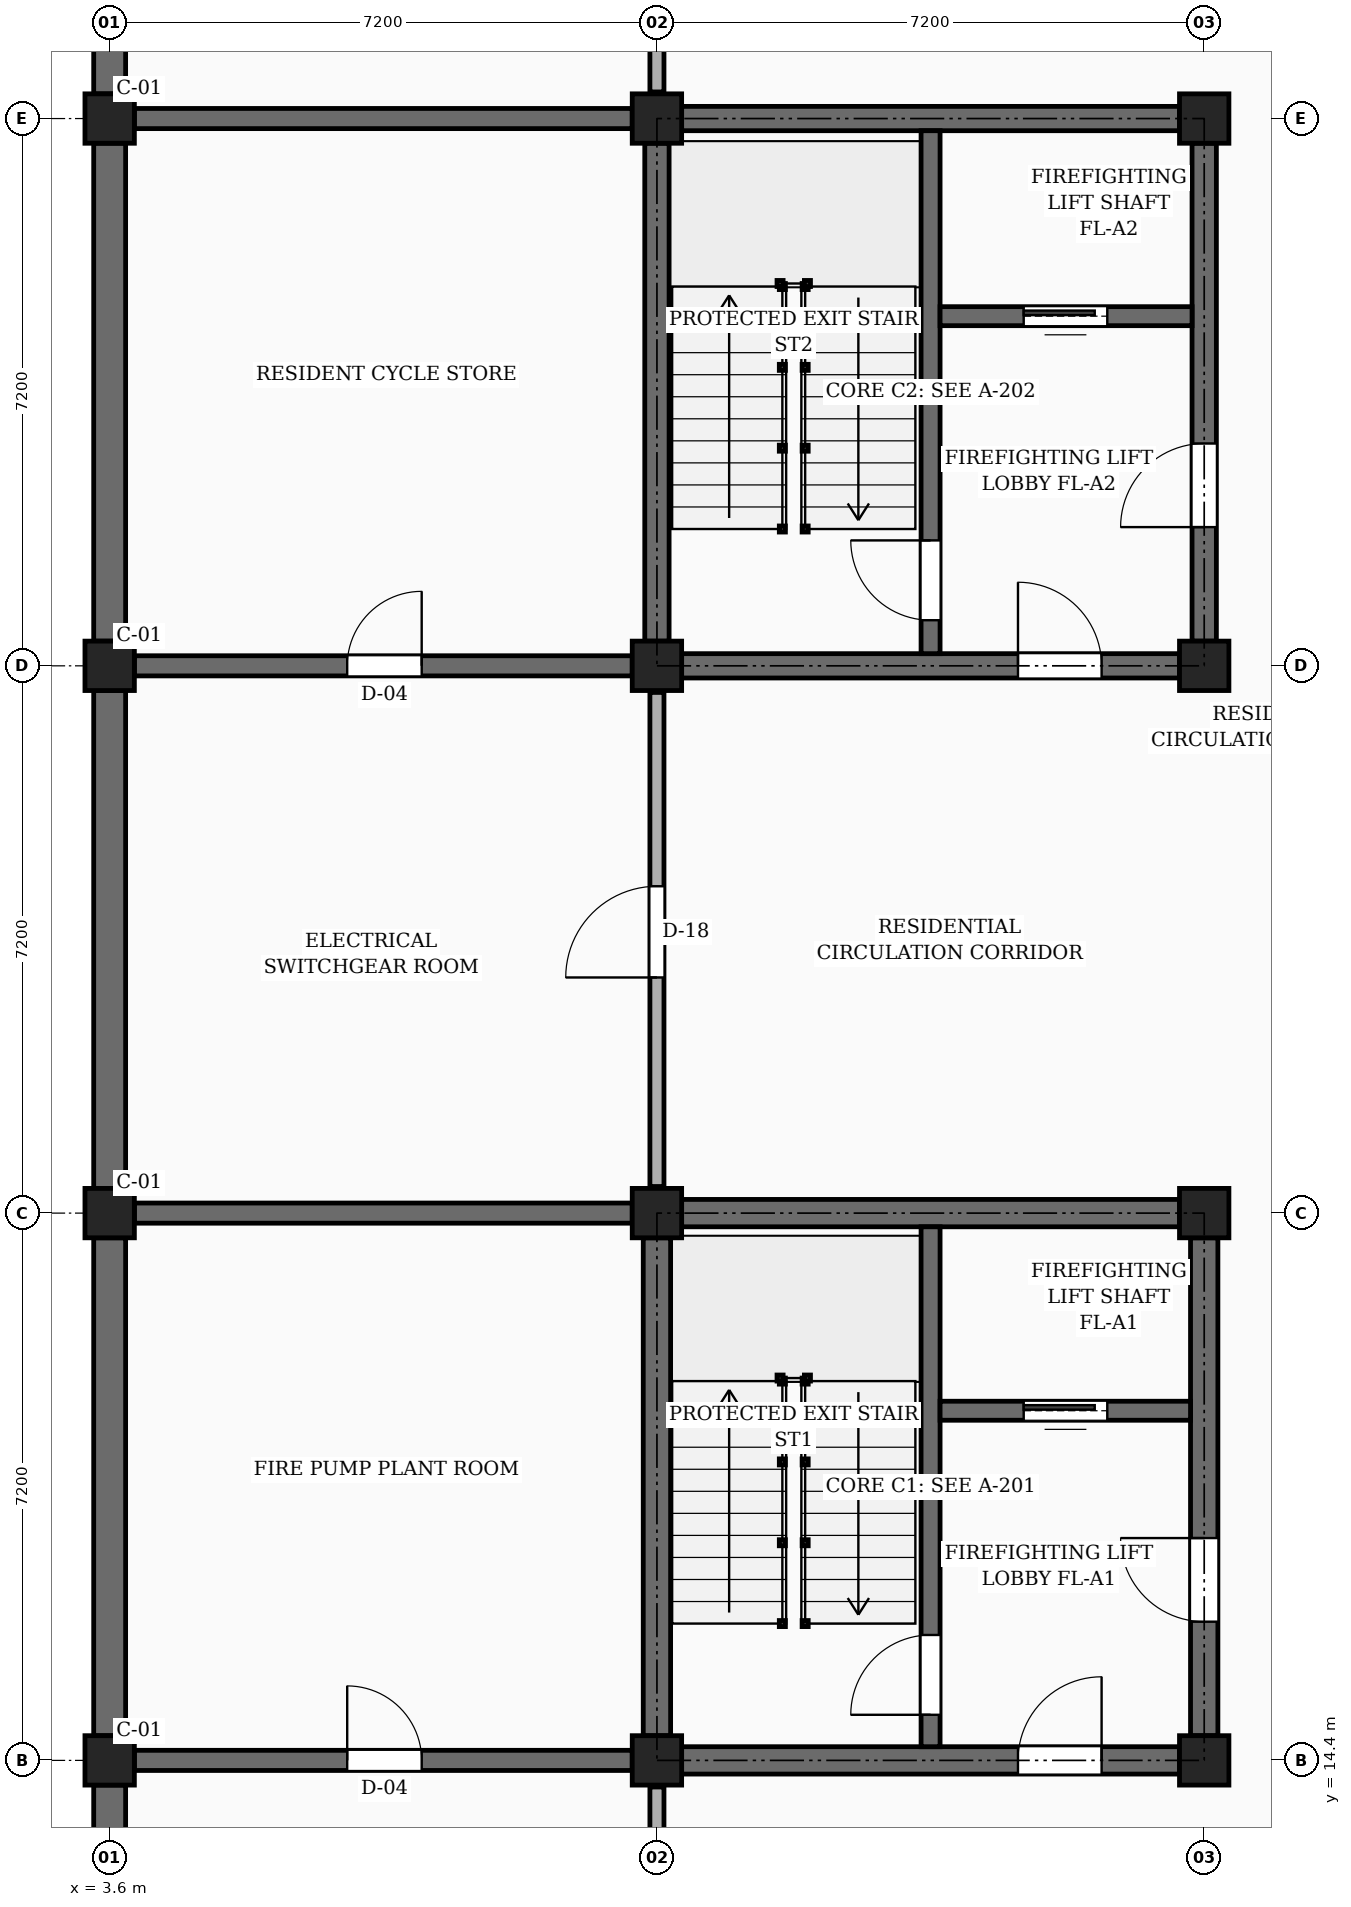
"""IFC4 building model, lengths in metres.
Left out: names, types, materials, properties, quantities, classifications, styles, units other than length and angle.
Written with IfcOpenShell. Run it as: python <this file> out.ifc"""

import sys

from ifc_helpers import new_model, si_unit, direction, frame, frame_2d, origin, origin_2d, place, context, subcontext, project, spatial, rectangle, extrude, element, fill, save


model = new_model("IFC4")
c1 = context("Model", 3, precision=1e-05, world=origin(), true_north=direction((0.0, 1.0)))
c2 = subcontext(c1, "Body", "Model", "MODEL_VIEW")
j1 = project(units=[si_unit("LENGTHUNIT", "METRE"), si_unit("PLANEANGLEUNIT", "RADIAN")], contexts=[c1])
p1 = place(None, origin())
s1 = spatial("IfcSite", under=j1, at=p1, CompositionType="ELEMENT")
p2 = place(p1, origin())
s2 = spatial("IfcBuilding", under=s1, at=p2, CompositionType="ELEMENT")
p3 = place(p2, frame((0.0, 0.0, -4.2)))
s3 = spatial("IfcBuildingStorey", under=s2, at=p3, CompositionType="ELEMENT", Elevation=-4.2)
for number, where, z_axis, x_axis in (
    (1, (3.6, 14.4, 0.0), (0.0, 0.0, 1.0), (1.0, 0.0, 0.0)),
    (2, (3.6, 21.6, 0.0), (0.0, 0.0, 1.0), (1.0, 0.0, 0.0)),
    (3, (3.6, 28.8, 0.0), (0.0, 0.0, 1.0), (1.0, 0.0, 0.0)),
    (4, (3.6, 36.0, 0.0), (0.0, 0.0, 1.0), (1.0, 0.0, 0.0)),
    (5, (10.8, 14.4, 0.0), (0.0, 0.0, 1.0), (1.0, 0.0, 0.0)),
    (6, (10.8, 21.6, 0.0), (0.0, 0.0, 1.0), (1.0, 0.0, 0.0)),
    (7, (10.8, 28.8, 0.0), (0.0, 0.0, 1.0), (1.0, 0.0, 0.0)),
    (8, (10.8, 36.0, 0.0), (0.0, 0.0, 1.0), (1.0, 0.0, 0.0)),
    (9, (18.0, 14.4, 0.0), (0.0, 0.0, 1.0), (1.0, 0.0, 0.0)),
    (10, (18.0, 21.6, 0.0), (0.0, 0.0, 1.0), (1.0, 0.0, 0.0)),
    (11, (18.0, 28.8, 0.0), (0.0, 0.0, 1.0), (1.0, 0.0, 0.0)),
    (12, (18.0, 36.0, 0.0), (0.0, 0.0, 1.0), (1.0, 0.0, 0.0)),
):
    element("IfcColumn", number, at=place(p3, frame(where, z_axis=z_axis, x_axis=x_axis)), inside=s3, PredefinedType="COLUMN", context=c2, shape_type="SweptSolid", body=[
        extrude(rectangle(XDim=0.65, YDim=0.65, at=origin_2d()), origin(), (0.0, 0.0, 1.0), 4.2),
    ])
p4 = place(p3, frame((3.6, 14.075, 0.0), z_axis=(0.0, 0.0, 1.0), x_axis=(0.0, -1.0, 0.0)))
e13 = element("IfcWall", 13, at=p4, inside=s3, PredefinedType="USERDEFINED", context=c2, shape_type="SweptSolid", body=[
    extrude(rectangle(XDim=6.55, YDim=0.42, at=frame_2d((3.275, 0.0))), origin(), (0.0, 0.0, 1.0), 3.03),
])
p5 = place(p3, frame((3.6, 21.275, 0.0), z_axis=(0.0, 0.0, 1.0), x_axis=(0.0, -1.0, 0.0)))
e14 = element("IfcWall", 14, at=p5, inside=s3, PredefinedType="USERDEFINED", context=c2, shape_type="SweptSolid", body=[
    extrude(rectangle(XDim=6.55, YDim=0.42, at=frame_2d((3.275, 0.0))), origin(), (0.0, 0.0, 1.0), 3.03),
])
for number, where, z_axis, x_axis in (
    (15, (3.6, 28.475, 0.0), (0.0, 0.0, 1.0), (0.0, -1.0, 0.0)),
    (16, (3.6, 35.675, 0.0), (0.0, 0.0, 1.0), (0.0, -1.0, 0.0)),
    (17, (3.6, 42.875, 0.0), (0.0, 0.0, 1.0), (0.0, -1.0, 0.0)),
):
    element("IfcWall", number, at=place(p3, frame(where, z_axis=z_axis, x_axis=x_axis)), inside=s3, PredefinedType="USERDEFINED", context=c2, shape_type="SweptSolid", body=[
        extrude(rectangle(XDim=6.55, YDim=0.42, at=frame_2d((3.275, 0.0))), origin(), (0.0, 0.0, 1.0), 3.03),
    ])
p6 = place(p3, frame((3.925, 14.4, 0.0), z_axis=(0.0, 0.0, 1.0), x_axis=(1.0, 0.0, 0.0)))
e18 = element("IfcWall", 18, at=p6, inside=s3, PredefinedType="SOLIDWALL", context=c2, shape_type="SweptSolid", body=[
    extrude(rectangle(XDim=6.55, YDim=0.265, at=frame_2d((3.275, 0.0))), origin(), (0.0, 0.0, 1.0), 3.18),
])
p7 = place(p6, frame((2.8, 0.0, 0.0)))
e19 = element("IfcOpeningElement", 19, at=p7, cuts=e18, PredefinedType="OPENING", context=c2, shape_type="SweptSolid", body=[
    extrude(rectangle(XDim=0.98, YDim=2.12, at=frame_2d((0.49, 1.06))), frame((0.0, 0.143, 0.0), z_axis=(0.0, -1.0, 0.0), x_axis=(1.0, 0.0, 0.0)), (0.0, 0.0, 1.0), 0.285),
])
p8 = place(p3, frame((3.925, 21.6, 0.0), z_axis=(0.0, 0.0, 1.0), x_axis=(1.0, 0.0, 0.0)))
e20 = element("IfcWall", 20, at=p8, inside=s3, PredefinedType="SOLIDWALL", context=c2, shape_type="SweptSolid", body=[
    extrude(rectangle(XDim=6.55, YDim=0.265, at=frame_2d((3.275, 0.0))), origin(), (0.0, 0.0, 1.0), 3.18),
])
p9 = place(p3, frame((3.925, 28.8, 0.0), z_axis=(0.0, 0.0, 1.0), x_axis=(1.0, 0.0, 0.0)))
e21 = element("IfcWall", 21, at=p9, inside=s3, PredefinedType="SOLIDWALL", context=c2, shape_type="SweptSolid", body=[
    extrude(rectangle(XDim=6.55, YDim=0.265, at=frame_2d((3.275, 0.0))), origin(), (0.0, 0.0, 1.0), 3.18),
])
p10 = place(p9, frame((2.8, 0.0, 0.0)))
e22 = element("IfcOpeningElement", 22, at=p10, cuts=e21, PredefinedType="OPENING", context=c2, shape_type="SweptSolid", body=[
    extrude(rectangle(XDim=0.98, YDim=2.12, at=frame_2d((0.49, 1.06))), frame((0.0, 0.143, 0.0), z_axis=(0.0, -1.0, 0.0), x_axis=(1.0, 0.0, 0.0)), (0.0, 0.0, 1.0), 0.285),
])
p11 = place(p3, frame((3.925, 36.0, 0.0), z_axis=(0.0, 0.0, 1.0), x_axis=(1.0, 0.0, 0.0)))
e23 = element("IfcWall", 23, at=p11, inside=s3, PredefinedType="SOLIDWALL", context=c2, shape_type="SweptSolid", body=[
    extrude(rectangle(XDim=6.55, YDim=0.265, at=frame_2d((3.275, 0.0))), origin(), (0.0, 0.0, 1.0), 3.18),
])
p12 = place(p3, frame((10.8, 14.725, 0.0), z_axis=(0.0, 0.0, 1.0), x_axis=(0.0, 1.0, 0.0)))
e24 = element("IfcWall", 24, at=p12, inside=s3, PredefinedType="SHEAR", context=c2, shape_type="SweptSolid", body=[
    extrude(rectangle(XDim=6.55, YDim=0.36, at=frame_2d((3.275, 0.0))), origin(), (0.0, 0.0, 1.0), 3.88),
])
p13 = place(p3, frame((11.125, 21.6, 0.0), z_axis=(0.0, 0.0, 1.0), x_axis=(1.0, 0.0, 0.0)))
e25 = element("IfcWall", 25, at=p13, inside=s3, PredefinedType="SHEAR", context=c2, shape_type="SweptSolid", body=[
    extrude(rectangle(XDim=6.55, YDim=0.36, at=frame_2d((3.275, 0.0))), origin(), (0.0, 0.0, 1.0), 3.88),
])
p14 = place(p3, frame((18.0, 14.725, 0.0), z_axis=(0.0, 0.0, 1.0), x_axis=(0.0, 1.0, 0.0)))
e26 = element("IfcWall", 26, at=p14, inside=s3, PredefinedType="SHEAR", context=c2, shape_type="SweptSolid", body=[
    extrude(rectangle(XDim=6.55, YDim=0.36, at=frame_2d((3.275, 0.0))), origin(), (0.0, 0.0, 1.0), 3.88),
])
p15 = place(p14, frame((1.5, 0.0, 0.0)))
e27 = element("IfcOpeningElement", 27, at=p15, cuts=e26, PredefinedType="OPENING", context=c2, shape_type="SweptSolid", body=[
    extrude(rectangle(XDim=1.1, YDim=2.15, at=frame_2d((0.55, 1.075))), frame((0.0, 0.19, 0.0), z_axis=(0.0, -1.0, 0.0), x_axis=(1.0, 0.0, 0.0)), (0.0, 0.0, 1.0), 0.38),
])
p16 = place(p3, frame((11.125, 14.4, 0.0), z_axis=(0.0, 0.0, 1.0), x_axis=(1.0, 0.0, 0.0)))
e28 = element("IfcWall", 28, at=p16, inside=s3, PredefinedType="SHEAR", context=c2, shape_type="SweptSolid", body=[
    extrude(rectangle(XDim=6.55, YDim=0.36, at=frame_2d((3.275, 0.0))), origin(), (0.0, 0.0, 1.0), 3.88),
])
p17 = place(p16, frame((4.425, 0.0, 0.0)))
e29 = element("IfcOpeningElement", 29, at=p17, cuts=e28, PredefinedType="OPENING", context=c2, shape_type="SweptSolid", body=[
    extrude(rectangle(XDim=1.1, YDim=2.15, at=frame_2d((0.55, 1.075))), frame((0.0, 0.19, 0.0), z_axis=(0.0, -1.0, 0.0), x_axis=(1.0, 0.0, 0.0)), (0.0, 0.0, 1.0), 0.38),
])
p18 = place(p3, frame((14.4, 14.58, 0.0), z_axis=(0.0, 0.0, 1.0), x_axis=(0.0, 1.0, 0.0)))
e30 = element("IfcWall", 30, at=p18, inside=s3, PredefinedType="SHEAR", context=c2, shape_type="SweptSolid", body=[
    extrude(rectangle(XDim=6.84, YDim=0.25, at=frame_2d((3.42, 0.0))), origin(), (0.0, 0.0, 1.0), 3.88),
])
p19 = place(p18, frame((0.42, 0.0, 0.0)))
e31 = element("IfcOpeningElement", 31, at=p19, cuts=e30, PredefinedType="OPENING", context=c2, shape_type="SweptSolid", body=[
    extrude(rectangle(XDim=1.05, YDim=2.15, at=frame_2d((0.525, 1.075))), frame((0.0, 0.135, 0.0), z_axis=(0.0, -1.0, 0.0), x_axis=(1.0, 0.0, 0.0)), (0.0, 0.0, 1.0), 0.27),
])
p20 = place(p3, frame((14.525, 19.0, 0.0), z_axis=(0.0, 0.0, 1.0), x_axis=(1.0, 0.0, 0.0)))
e32 = element("IfcWall", 32, at=p20, inside=s3, PredefinedType="SHEAR", context=c2, shape_type="SweptSolid", body=[
    extrude(rectangle(XDim=3.295, YDim=0.25, at=frame_2d((1.647, 0.0))), origin(), (0.0, 0.0, 1.0), 3.88),
])
p21 = place(p20, frame((1.1, 0.0, 0.0)))
e33 = element("IfcOpeningElement", 33, at=p21, cuts=e32, PredefinedType="OPENING", context=c2, shape_type="SweptSolid", body=[
    extrude(rectangle(XDim=1.1, YDim=2.2, at=frame_2d((0.55, 1.1))), frame((0.0, 0.135, 0.0), z_axis=(0.0, -1.0, 0.0), x_axis=(1.0, 0.0, 0.0)), (0.0, 0.0, 1.0), 0.27),
])
for number, where, z_axis, x_axis in (
    (34, (10.8, 29.125, 0.0), (0.0, 0.0, 1.0), (0.0, 1.0, 0.0)),
    (35, (11.125, 36.0, 0.0), (0.0, 0.0, 1.0), (1.0, 0.0, 0.0)),
):
    element("IfcWall", number, at=place(p3, frame(where, z_axis=z_axis, x_axis=x_axis)), inside=s3, PredefinedType="SHEAR", context=c2, shape_type="SweptSolid", body=[
        extrude(rectangle(XDim=6.55, YDim=0.32, at=frame_2d((3.275, 0.0))), origin(), (0.0, 0.0, 1.0), 3.88),
    ])
p22 = place(p3, frame((18.0, 29.125, 0.0), z_axis=(0.0, 0.0, 1.0), x_axis=(0.0, 1.0, 0.0)))
e36 = element("IfcWall", 36, at=p22, inside=s3, PredefinedType="SHEAR", context=c2, shape_type="SweptSolid", body=[
    extrude(rectangle(XDim=6.55, YDim=0.32, at=frame_2d((3.275, 0.0))), origin(), (0.0, 0.0, 1.0), 3.88),
])
p23 = place(p22, frame((1.5, 0.0, 0.0)))
e37 = element("IfcOpeningElement", 37, at=p23, cuts=e36, PredefinedType="OPENING", context=c2, shape_type="SweptSolid", body=[
    extrude(rectangle(XDim=1.1, YDim=2.15, at=frame_2d((0.55, 1.075))), frame((0.0, 0.17, 0.0), z_axis=(0.0, -1.0, 0.0), x_axis=(1.0, 0.0, 0.0)), (0.0, 0.0, 1.0), 0.34),
])
p24 = place(p3, frame((11.125, 28.8, 0.0), z_axis=(0.0, 0.0, 1.0), x_axis=(1.0, 0.0, 0.0)))
e38 = element("IfcWall", 38, at=p24, inside=s3, PredefinedType="SHEAR", context=c2, shape_type="SweptSolid", body=[
    extrude(rectangle(XDim=6.55, YDim=0.32, at=frame_2d((3.275, 0.0))), origin(), (0.0, 0.0, 1.0), 3.88),
])
p25 = place(p24, frame((4.425, 0.0, 0.0)))
e39 = element("IfcOpeningElement", 39, at=p25, cuts=e38, PredefinedType="OPENING", context=c2, shape_type="SweptSolid", body=[
    extrude(rectangle(XDim=1.1, YDim=2.15, at=frame_2d((0.55, 1.075))), frame((0.0, 0.17, 0.0), z_axis=(0.0, -1.0, 0.0), x_axis=(1.0, 0.0, 0.0)), (0.0, 0.0, 1.0), 0.34),
])
p26 = place(p3, frame((14.4, 28.96, 0.0), z_axis=(0.0, 0.0, 1.0), x_axis=(0.0, 1.0, 0.0)))
e40 = element("IfcWall", 40, at=p26, inside=s3, PredefinedType="SHEAR", context=c2, shape_type="SweptSolid", body=[
    extrude(rectangle(XDim=6.88, YDim=0.25, at=frame_2d((3.44, 0.0))), origin(), (0.0, 0.0, 1.0), 3.88),
])
p27 = place(p26, frame((0.44, 0.0, 0.0)))
e41 = element("IfcOpeningElement", 41, at=p27, cuts=e40, PredefinedType="OPENING", context=c2, shape_type="SweptSolid", body=[
    extrude(rectangle(XDim=1.05, YDim=2.15, at=frame_2d((0.525, 1.075))), frame((0.0, 0.135, 0.0), z_axis=(0.0, -1.0, 0.0), x_axis=(1.0, 0.0, 0.0)), (0.0, 0.0, 1.0), 0.27),
])
p28 = place(p3, frame((14.525, 33.4, 0.0), z_axis=(0.0, 0.0, 1.0), x_axis=(1.0, 0.0, 0.0)))
e42 = element("IfcWall", 42, at=p28, inside=s3, PredefinedType="SHEAR", context=c2, shape_type="SweptSolid", body=[
    extrude(rectangle(XDim=3.315, YDim=0.25, at=frame_2d((1.658, 0.0))), origin(), (0.0, 0.0, 1.0), 3.88),
])
p29 = place(p28, frame((1.1, 0.0, 0.0)))
e43 = element("IfcOpeningElement", 43, at=p29, cuts=e42, PredefinedType="OPENING", context=c2, shape_type="SweptSolid", body=[
    extrude(rectangle(XDim=1.1, YDim=2.2, at=frame_2d((0.55, 1.1))), frame((0.0, 0.135, 0.0), z_axis=(0.0, -1.0, 0.0), x_axis=(1.0, 0.0, 0.0)), (0.0, 0.0, 1.0), 0.27),
])
p30 = place(p3, frame((10.8, 7.55, 0.0), z_axis=(0.0, 0.0, 1.0), x_axis=(0.0, 1.0, 0.0)))
e44 = element("IfcWall", 44, at=p30, inside=s3, PredefinedType="PARTITIONING", context=c2, shape_type="SweptSolid", body=[
    extrude(rectangle(XDim=6.5, YDim=0.185, at=frame_2d((3.25, 0.0))), origin(), (0.0, 0.0, 1.0), 3.08),
])
p31 = place(p30, frame((2.75, 0.0, 0.0)))
e45 = element("IfcOpeningElement", 45, at=p31, cuts=e44, PredefinedType="OPENING", context=c2, shape_type="SweptSolid", body=[
    extrude(rectangle(XDim=1.2, YDim=2.2, at=frame_2d((0.6, 1.1))), frame((0.0, 0.103, 0.0), z_axis=(0.0, -1.0, 0.0), x_axis=(1.0, 0.0, 0.0)), (0.0, 0.0, 1.0), 0.205),
])
p32 = place(p3, frame((10.8, 21.95, 0.0), z_axis=(0.0, 0.0, 1.0), x_axis=(0.0, 1.0, 0.0)))
e46 = element("IfcWall", 46, at=p32, inside=s3, PredefinedType="PARTITIONING", context=c2, shape_type="SweptSolid", body=[
    extrude(rectangle(XDim=6.5, YDim=0.185, at=frame_2d((3.25, 0.0))), origin(), (0.0, 0.0, 1.0), 3.08),
])
p33 = place(p32, frame((2.75, 0.0, 0.0)))
e47 = element("IfcOpeningElement", 47, at=p33, cuts=e46, PredefinedType="OPENING", context=c2, shape_type="SweptSolid", body=[
    extrude(rectangle(XDim=1.2, YDim=2.2, at=frame_2d((0.6, 1.1))), frame((0.0, 0.103, 0.0), z_axis=(0.0, -1.0, 0.0), x_axis=(1.0, 0.0, 0.0)), (0.0, 0.0, 1.0), 0.205),
])
p34 = place(p3, frame((10.8, 36.35, 0.0), z_axis=(0.0, 0.0, 1.0), x_axis=(0.0, 1.0, 0.0)))
e48 = element("IfcWall", 48, at=p34, inside=s3, PredefinedType="PARTITIONING", context=c2, shape_type="SweptSolid", body=[
    extrude(rectangle(XDim=6.5, YDim=0.185, at=frame_2d((3.25, 0.0))), origin(), (0.0, 0.0, 1.0), 3.08),
])
p35 = place(p34, frame((2.75, 0.0, 0.0)))
e49 = element("IfcOpeningElement", 49, at=p35, cuts=e48, PredefinedType="OPENING", context=c2, shape_type="SweptSolid", body=[
    extrude(rectangle(XDim=1.2, YDim=2.2, at=frame_2d((0.6, 1.1))), frame((0.0, 0.103, 0.0), z_axis=(0.0, -1.0, 0.0), x_axis=(1.0, 0.0, 0.0)), (0.0, 0.0, 1.0), 0.205),
])
p36 = place(p15, frame((1.1, 0.0, 0.0), z_axis=(0.0, 0.0, 1.0), x_axis=(-1.0, 0.0, 0.0)))
e50 = element("IfcDoor", 50, at=p36, inside=s3, OperationType="SINGLE_SWING_RIGHT", PredefinedType="DOOR", context=c2, shape_type="SweptSolid", body=[
    extrude(rectangle(XDim=1.1, YDim=2.15, at=frame_2d((0.55, 1.075))), frame((0.0, 0.025, 0.0), z_axis=(0.0, -1.0, 0.0), x_axis=(1.0, 0.0, 0.0)), (0.0, 0.0, 1.0), 0.05),
])
fill(e27, e50)
p37 = place(p17, frame((1.1, 0.0, 0.0), z_axis=(0.0, 0.0, 1.0), x_axis=(-1.0, 0.0, 0.0)))
e51 = element("IfcDoor", 51, at=p37, inside=s3, OperationType="SINGLE_SWING_RIGHT", PredefinedType="DOOR", context=c2, shape_type="SweptSolid", body=[
    extrude(rectangle(XDim=1.1, YDim=2.15, at=frame_2d((0.55, 1.075))), frame((0.0, 0.025, 0.0), z_axis=(0.0, -1.0, 0.0), x_axis=(1.0, 0.0, 0.0)), (0.0, 0.0, 1.0), 0.05),
])
fill(e29, e51)
p38 = place(p19, origin())
e52 = element("IfcDoor", 52, at=p38, inside=s3, OperationType="SINGLE_SWING_LEFT", PredefinedType="DOOR", context=c2, shape_type="SweptSolid", body=[
    extrude(rectangle(XDim=1.05, YDim=2.15, at=frame_2d((0.525, 1.075))), frame((0.0, 0.025, 0.0), z_axis=(0.0, -1.0, 0.0), x_axis=(1.0, 0.0, 0.0)), (0.0, 0.0, 1.0), 0.05),
])
fill(e31, e52)
p39 = place(p21, origin())
e53 = element("IfcDoor", 53, at=p39, inside=s3, OperationType="SLIDING_TO_LEFT", PredefinedType="DOOR", context=c2, shape_type="SweptSolid", body=[
    extrude(rectangle(XDim=1.1, YDim=2.2, at=frame_2d((0.55, 1.1))), frame((0.0, 0.025, 0.0), z_axis=(0.0, -1.0, 0.0), x_axis=(1.0, 0.0, 0.0)), (0.0, 0.0, 1.0), 0.05),
])
fill(e33, e53)
p40 = place(p23, frame((1.1, 0.0, 0.0), z_axis=(0.0, 0.0, 1.0), x_axis=(-1.0, 0.0, 0.0)))
e54 = element("IfcDoor", 54, at=p40, inside=s3, OperationType="SINGLE_SWING_LEFT", PredefinedType="DOOR", context=c2, shape_type="SweptSolid", body=[
    extrude(rectangle(XDim=1.1, YDim=2.15, at=frame_2d((0.55, 1.075))), frame((0.0, 0.025, 0.0), z_axis=(0.0, -1.0, 0.0), x_axis=(1.0, 0.0, 0.0)), (0.0, 0.0, 1.0), 0.05),
])
fill(e37, e54)
p41 = place(p25, frame((1.1, 0.0, 0.0), z_axis=(0.0, 0.0, 1.0), x_axis=(-1.0, 0.0, 0.0)))
e55 = element("IfcDoor", 55, at=p41, inside=s3, OperationType="SINGLE_SWING_LEFT", PredefinedType="DOOR", context=c2, shape_type="SweptSolid", body=[
    extrude(rectangle(XDim=1.1, YDim=2.15, at=frame_2d((0.55, 1.075))), frame((0.0, 0.025, 0.0), z_axis=(0.0, -1.0, 0.0), x_axis=(1.0, 0.0, 0.0)), (0.0, 0.0, 1.0), 0.05),
])
fill(e39, e55)
p42 = place(p27, origin())
e56 = element("IfcDoor", 56, at=p42, inside=s3, OperationType="SINGLE_SWING_RIGHT", PredefinedType="DOOR", context=c2, shape_type="SweptSolid", body=[
    extrude(rectangle(XDim=1.05, YDim=2.15, at=frame_2d((0.525, 1.075))), frame((0.0, 0.025, 0.0), z_axis=(0.0, -1.0, 0.0), x_axis=(1.0, 0.0, 0.0)), (0.0, 0.0, 1.0), 0.05),
])
fill(e41, e56)
p43 = place(p29, origin())
e57 = element("IfcDoor", 57, at=p43, inside=s3, OperationType="SLIDING_TO_LEFT", PredefinedType="DOOR", context=c2, shape_type="SweptSolid", body=[
    extrude(rectangle(XDim=1.1, YDim=2.2, at=frame_2d((0.55, 1.1))), frame((0.0, 0.025, 0.0), z_axis=(0.0, -1.0, 0.0), x_axis=(1.0, 0.0, 0.0)), (0.0, 0.0, 1.0), 0.05),
])
fill(e43, e57)
p44 = place(p33, origin())
e58 = element("IfcDoor", 58, at=p44, inside=s3, OperationType="SINGLE_SWING_LEFT", PredefinedType="DOOR", context=c2, shape_type="SweptSolid", body=[
    extrude(rectangle(XDim=1.2, YDim=2.2, at=frame_2d((0.6, 1.1))), frame((0.0, 0.025, 0.0), z_axis=(0.0, -1.0, 0.0), x_axis=(1.0, 0.0, 0.0)), (0.0, 0.0, 1.0), 0.05),
])
fill(e47, e58)
p45 = place(p7, origin())
e59 = element("IfcDoor", 59, at=p45, inside=s3, OperationType="SINGLE_SWING_LEFT", PredefinedType="DOOR", context=c2, shape_type="SweptSolid", body=[
    extrude(rectangle(XDim=0.98, YDim=2.12, at=frame_2d((0.49, 1.06))), frame((0.0, 0.025, 0.0), z_axis=(0.0, -1.0, 0.0), x_axis=(1.0, 0.0, 0.0)), (0.0, 0.0, 1.0), 0.05),
])
fill(e19, e59)
p46 = place(p10, origin())
e60 = element("IfcDoor", 60, at=p46, inside=s3, OperationType="SINGLE_SWING_RIGHT", PredefinedType="DOOR", context=c2, shape_type="SweptSolid", body=[
    extrude(rectangle(XDim=0.98, YDim=2.12, at=frame_2d((0.49, 1.06))), frame((0.0, 0.025, 0.0), z_axis=(0.0, -1.0, 0.0), x_axis=(1.0, 0.0, 0.0)), (0.0, 0.0, 1.0), 0.05),
])
fill(e22, e60)
save(model, sys.argv[1])
